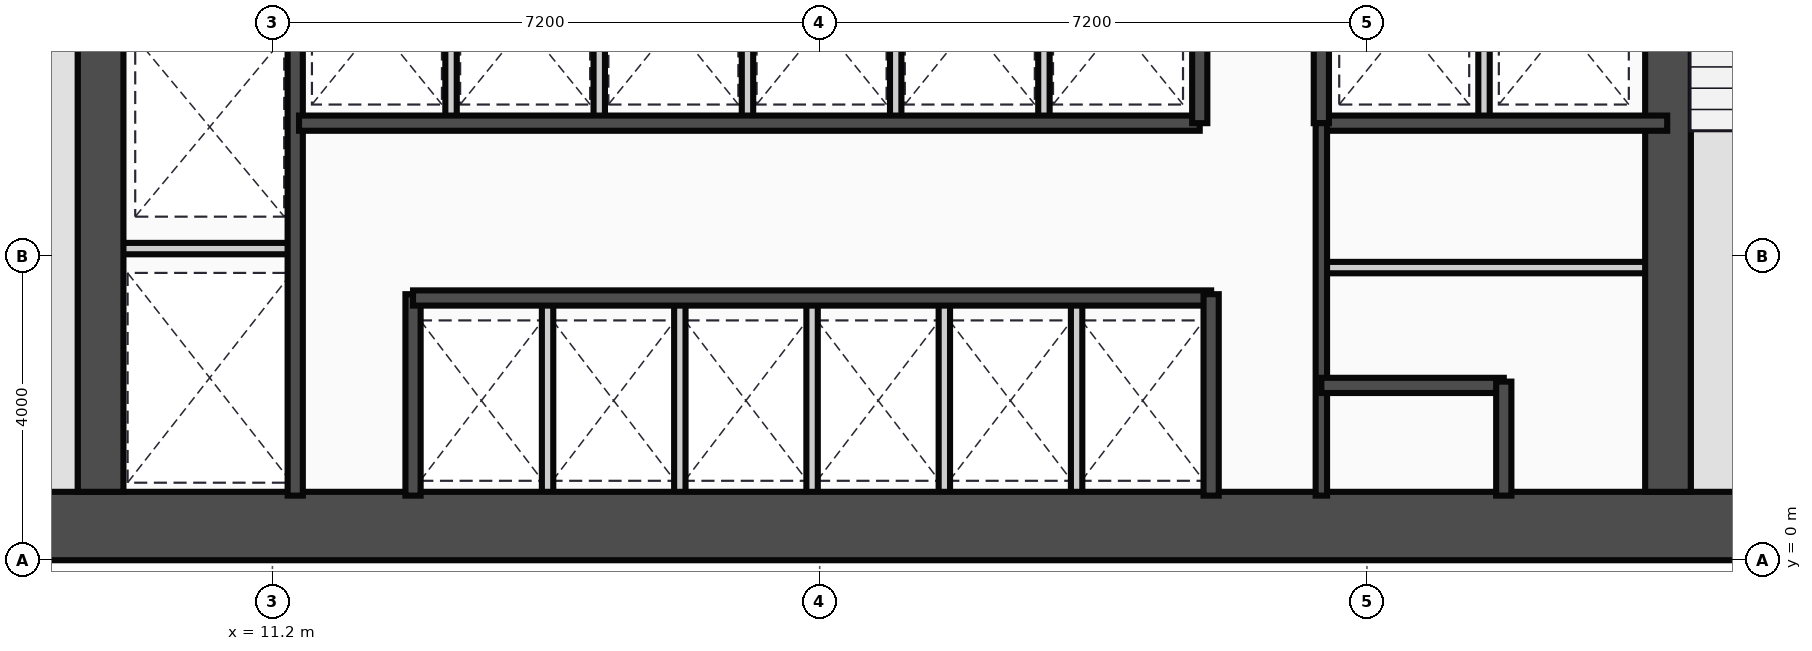
"""IFC4 building model, lengths in metres.
Left out: names, types, materials, properties, quantities, classifications, styles, units other than length and angle.
Written with IfcOpenShell. Run it as: python <this file> out.ifc"""

import sys

from ifc_helpers import new_model, si_unit, direction, frame, frame_2d, origin, place, context, subcontext, project, spatial, rectangle, extrude, source, transform, mapped, element, fill, save


model = new_model("IFC4")
c1 = context("Model", 3, precision=1e-05, world=origin(), true_north=direction((0.0, 1.0)))
c2 = subcontext(c1, "Body", "Model", "MODEL_VIEW")
j1 = project(units=[si_unit("LENGTHUNIT", "METRE"), si_unit("PLANEANGLEUNIT", "RADIAN")], contexts=[c1])
p1 = place(None, origin())
s1 = spatial("IfcSite", under=j1, at=p1, CompositionType="ELEMENT")
p2 = place(p1, origin())
s2 = spatial("IfcBuilding", under=s1, at=p2, CompositionType="ELEMENT")
p3 = place(p2, frame((0.0, 0.0, 32.5)))
s3 = spatial("IfcBuildingStorey", under=s2, at=p3, CompositionType="ELEMENT", Elevation=32.5)
m1 = source(origin(), c2, "Body", "SweptSolid", [
    extrude(rectangle(XDim=29.5, YDim=0.9, at=frame_2d((14.75, 0.0))), origin(), (0.0, 0.0, 1.0), 3.65),
])
p4 = place(p3, frame((4.5, 0.45, 0.0), z_axis=(0.0, 0.0, 1.0), x_axis=(1.0, 0.0, 0.0)))
e1 = element("IfcWall", 1, at=p4, inside=s3, PredefinedType="SHEAR", context=c2, shape_type="MappedRepresentation", body=[
    mapped(m1, transform((0.0, 0.0, 0.0))),
])
m2 = source(origin(), c2, "Body", "SweptSolid", [
    extrude(rectangle(XDim=12.2, YDim=0.6, at=frame_2d((6.1, 0.0))), origin(), (0.0, 0.0, 1.0), 3.65),
])
for number, where, z_axis, x_axis in (
    (2, (8.94, 0.9, 0.0), (0.0, 0.0, 1.0), (0.0, 1.0, 0.0)),
    (3, (29.56, 0.9, 0.0), (0.0, 0.0, 1.0), (0.0, 1.0, 0.0)),
):
    element("IfcWall", number, at=place(p3, frame(where, z_axis=z_axis, x_axis=x_axis)), inside=s3, PredefinedType="SHEAR", context=c2, shape_type="MappedRepresentation", body=[
        mapped(m2, transform((0.0, 0.0, 0.0))),
    ])
m3 = source(origin(), c2, "Body", "SweptSolid", [
    extrude(rectangle(XDim=9.6, YDim=0.2, at=frame_2d((4.8, 0.0))), origin(), (0.0, 0.0, 1.0), 3.4),
])
p5 = place(p3, frame((11.5, 0.85, 0.0), z_axis=(0.0, 0.0, 1.0), x_axis=(0.0, 1.0, 0.0)))
e4 = element("IfcWall", 4, at=p5, inside=s3, PredefinedType="PARTITIONING", context=c2, shape_type="MappedRepresentation", body=[
    mapped(m3, transform((0.0, 0.0, 0.0))),
])
p6 = place(p5, frame((4.2, 0.0, 0.0)))
e5 = element("IfcOpeningElement", 5, at=p6, cuts=e4, PredefinedType="OPENING", context=c2, shape_type="SweptSolid", body=[
    extrude(rectangle(XDim=1.1, YDim=2.15, at=frame_2d((0.55, 1.075))), frame((0.0, 0.11, 0.0), z_axis=(0.0, -1.0, 0.0), x_axis=(1.0, 0.0, 0.0)), (0.0, 0.0, 1.0), 0.22),
])
p7 = place(p5, frame((0.9, 0.0, 0.0)))
e6 = element("IfcOpeningElement", 6, at=p7, cuts=e4, PredefinedType="OPENING", context=c2, shape_type="SweptSolid", body=[
    extrude(rectangle(XDim=1.2, YDim=2.15, at=frame_2d((0.6, 1.075))), frame((0.0, 0.11, 0.0), z_axis=(0.0, -1.0, 0.0), x_axis=(1.0, 0.0, 0.0)), (0.0, 0.0, 1.0), 0.22),
])
m4 = source(origin(), c2, "Body", "SweptSolid", [
    extrude(rectangle(XDim=2.4, YDim=0.15, at=frame_2d((1.2, 0.0))), origin(), (0.0, 0.0, 1.0), 3.4),
])
p8 = place(p3, frame((9.1, 4.1, 0.0), z_axis=(0.0, 0.0, 1.0), x_axis=(1.0, 0.0, 0.0)))
e7 = element("IfcWall", 7, at=p8, inside=s3, PredefinedType="PARTITIONING", context=c2, shape_type="MappedRepresentation", body=[
    mapped(m4, transform((0.0, 0.0, 0.0))),
])
m5 = source(origin(), c2, "Body", "SweptSolid", [
    extrude(rectangle(XDim=2.65, YDim=0.2, at=frame_2d((1.325, 0.0))), origin(), (0.0, 0.0, 1.0), 3.4),
])
p9 = place(p3, frame((13.05, 0.85, 0.0), z_axis=(0.0, 0.0, 1.0), x_axis=(0.0, 1.0, 0.0)))
e8 = element("IfcWall", 8, at=p9, inside=s3, PredefinedType="PARTITIONING", context=c2, shape_type="MappedRepresentation", body=[
    mapped(m5, transform((0.0, 0.0, 0.0))),
])
m6 = source(origin(), c2, "Body", "SweptSolid", [
    extrude(rectangle(XDim=10.5, YDim=0.2, at=frame_2d((5.25, 0.0))), origin(), (0.0, 0.0, 1.0), 3.4),
])
p10 = place(p3, frame((13.05, 3.45, 0.0), z_axis=(0.0, 0.0, 1.0), x_axis=(1.0, 0.0, 0.0)))
e9 = element("IfcWall", 9, at=p10, inside=s3, PredefinedType="PARTITIONING", context=c2, shape_type="MappedRepresentation", body=[
    mapped(m6, transform((0.0, 0.0, 0.0))),
])
p11 = place(p10, frame((0.38, 0.0, 0.0)))
e10 = element("IfcOpeningElement", 10, at=p11, cuts=e9, PredefinedType="OPENING", context=c2, shape_type="SweptSolid", body=[
    extrude(rectangle(XDim=1.05, YDim=2.15, at=frame_2d((0.525, 1.075))), frame((0.0, 0.11, 0.0), z_axis=(0.0, -1.0, 0.0), x_axis=(1.0, 0.0, 0.0)), (0.0, 0.0, 1.0), 0.22),
])
p12 = place(p10, frame((2.12, 0.0, 0.0)))
e11 = element("IfcOpeningElement", 11, at=p12, cuts=e9, PredefinedType="OPENING", context=c2, shape_type="SweptSolid", body=[
    extrude(rectangle(XDim=1.05, YDim=2.15, at=frame_2d((0.525, 1.075))), frame((0.0, 0.11, 0.0), z_axis=(0.0, -1.0, 0.0), x_axis=(1.0, 0.0, 0.0)), (0.0, 0.0, 1.0), 0.22),
])
p13 = place(p10, frame((3.86, 0.0, 0.0)))
e12 = element("IfcOpeningElement", 12, at=p13, cuts=e9, PredefinedType="OPENING", context=c2, shape_type="SweptSolid", body=[
    extrude(rectangle(XDim=1.05, YDim=2.15, at=frame_2d((0.525, 1.075))), frame((0.0, 0.11, 0.0), z_axis=(0.0, -1.0, 0.0), x_axis=(1.0, 0.0, 0.0)), (0.0, 0.0, 1.0), 0.22),
])
p14 = place(p10, frame((5.6, 0.0, 0.0)))
e13 = element("IfcOpeningElement", 13, at=p14, cuts=e9, PredefinedType="OPENING", context=c2, shape_type="SweptSolid", body=[
    extrude(rectangle(XDim=1.05, YDim=2.15, at=frame_2d((0.525, 1.075))), frame((0.0, 0.11, 0.0), z_axis=(0.0, -1.0, 0.0), x_axis=(1.0, 0.0, 0.0)), (0.0, 0.0, 1.0), 0.22),
])
p15 = place(p10, frame((7.34, 0.0, 0.0)))
e14 = element("IfcOpeningElement", 14, at=p15, cuts=e9, PredefinedType="OPENING", context=c2, shape_type="SweptSolid", body=[
    extrude(rectangle(XDim=1.05, YDim=2.15, at=frame_2d((0.525, 1.075))), frame((0.0, 0.11, 0.0), z_axis=(0.0, -1.0, 0.0), x_axis=(1.0, 0.0, 0.0)), (0.0, 0.0, 1.0), 0.22),
])
p16 = place(p10, frame((9.08, 0.0, 0.0)))
e15 = element("IfcOpeningElement", 15, at=p16, cuts=e9, PredefinedType="OPENING", context=c2, shape_type="SweptSolid", body=[
    extrude(rectangle(XDim=1.05, YDim=2.15, at=frame_2d((0.525, 1.075))), frame((0.0, 0.11, 0.0), z_axis=(0.0, -1.0, 0.0), x_axis=(1.0, 0.0, 0.0)), (0.0, 0.0, 1.0), 0.22),
])
p17 = place(p3, frame((23.55, 0.85, 0.0), z_axis=(0.0, 0.0, 1.0), x_axis=(0.0, 1.0, 0.0)))
e16 = element("IfcWall", 16, at=p17, inside=s3, PredefinedType="PARTITIONING", context=c2, shape_type="MappedRepresentation", body=[
    mapped(m5, transform((0.0, 0.0, 0.0))),
])
m7 = source(origin(), c2, "Body", "SweptSolid", [
    extrude(rectangle(XDim=2.6, YDim=0.15, at=frame_2d((1.3, 0.0))), origin(), (0.0, 0.0, 1.0), 3.4),
])
for number, where, z_axis, x_axis in (
    (17, (14.82, 0.85, 0.0), (0.0, 0.0, 1.0), (0.0, 1.0, 0.0)),
    (18, (16.56, 0.85, 0.0), (0.0, 0.0, 1.0), (0.0, 1.0, 0.0)),
    (19, (18.3, 0.85, 0.0), (0.0, 0.0, 1.0), (0.0, 1.0, 0.0)),
    (20, (20.04, 0.85, 0.0), (0.0, 0.0, 1.0), (0.0, 1.0, 0.0)),
    (21, (21.78, 0.85, 0.0), (0.0, 0.0, 1.0), (0.0, 1.0, 0.0)),
):
    element("IfcWall", number, at=place(p3, frame(where, z_axis=z_axis, x_axis=x_axis)), inside=s3, PredefinedType="PARTITIONING", context=c2, shape_type="MappedRepresentation", body=[
        mapped(m7, transform((0.0, 0.0, 0.0))),
    ])
m8 = source(origin(), c2, "Body", "SweptSolid", [
    extrude(rectangle(XDim=11.85, YDim=0.2, at=frame_2d((5.925, 0.0))), origin(), (0.0, 0.0, 1.0), 3.4),
])
p18 = place(p3, frame((11.55, 5.75, 0.0), z_axis=(0.0, 0.0, 1.0), x_axis=(1.0, 0.0, 0.0)))
e22 = element("IfcWall", 22, at=p18, inside=s3, PredefinedType="PARTITIONING", context=c2, shape_type="MappedRepresentation", body=[
    mapped(m8, transform((0.0, 0.0, 0.0))),
])
m9 = source(origin(), c2, "Body", "SweptSolid", [
    extrude(rectangle(XDim=2.6, YDim=0.2, at=frame_2d((1.3, 0.0))), origin(), (0.0, 0.0, 1.0), 3.4),
])
p19 = place(p3, frame((23.4, 5.75, 0.0), z_axis=(0.0, 0.0, 1.0), x_axis=(0.0, 1.0, 0.0)))
e23 = element("IfcWall", 23, at=p19, inside=s3, PredefinedType="PARTITIONING", context=c2, shape_type="MappedRepresentation", body=[
    mapped(m9, transform((0.0, 0.0, 0.0))),
])
m10 = source(origin(), c2, "Body", "SweptSolid", [
    extrude(rectangle(XDim=2.5, YDim=0.15, at=frame_2d((1.25, 0.0))), origin(), (0.0, 0.0, 1.0), 3.4),
])
for number, where, z_axis, x_axis in (
    (24, (13.55, 5.8, 0.0), (0.0, 0.0, 1.0), (0.0, 1.0, 0.0)),
    (25, (15.5, 5.8, 0.0), (0.0, 0.0, 1.0), (0.0, 1.0, 0.0)),
    (26, (17.45, 5.8, 0.0), (0.0, 0.0, 1.0), (0.0, 1.0, 0.0)),
    (27, (19.4, 5.8, 0.0), (0.0, 0.0, 1.0), (0.0, 1.0, 0.0)),
    (28, (21.35, 5.8, 0.0), (0.0, 0.0, 1.0), (0.0, 1.0, 0.0)),
):
    element("IfcWall", number, at=place(p3, frame(where, z_axis=z_axis, x_axis=x_axis)), inside=s3, PredefinedType="PARTITIONING", context=c2, shape_type="MappedRepresentation", body=[
        mapped(m10, transform((0.0, 0.0, 0.0))),
    ])
m11 = source(origin(), c2, "Body", "SweptSolid", [
    extrude(rectangle(XDim=4.55, YDim=0.2, at=frame_2d((2.275, 0.0))), origin(), (0.0, 0.0, 1.0), 3.4),
])
p20 = place(p3, frame((25.0, 5.75, 0.0), z_axis=(0.0, 0.0, 1.0), x_axis=(1.0, 0.0, 0.0)))
e29 = element("IfcWall", 29, at=p20, inside=s3, PredefinedType="PARTITIONING", context=c2, shape_type="MappedRepresentation", body=[
    mapped(m11, transform((0.0, 0.0, 0.0))),
])
p21 = place(p3, frame((25.0, 5.75, 0.0), z_axis=(0.0, 0.0, 1.0), x_axis=(0.0, 1.0, 0.0)))
e30 = element("IfcWall", 30, at=p21, inside=s3, PredefinedType="PARTITIONING", context=c2, shape_type="MappedRepresentation", body=[
    mapped(m9, transform((0.0, 0.0, 0.0))),
])
p22 = place(p3, frame((27.14, 5.8, 0.0), z_axis=(0.0, 0.0, 1.0), x_axis=(0.0, 1.0, 0.0)))
e31 = element("IfcWall", 31, at=p22, inside=s3, PredefinedType="PARTITIONING", context=c2, shape_type="MappedRepresentation", body=[
    mapped(m10, transform((0.0, 0.0, 0.0))),
])
m12 = source(origin(), c2, "Body", "SweptSolid", [
    extrude(rectangle(XDim=4.9, YDim=0.15, at=frame_2d((2.45, 0.0))), origin(), (0.0, 0.0, 1.0), 3.4),
])
p23 = place(p3, frame((25.0, 0.85, 0.0), z_axis=(0.0, 0.0, 1.0), x_axis=(0.0, 1.0, 0.0)))
e32 = element("IfcWall", 32, at=p23, inside=s3, PredefinedType="PARTITIONING", context=c2, shape_type="MappedRepresentation", body=[
    mapped(m12, transform((0.0, 0.0, 0.0))),
])
p24 = place(p23, frame((1.8, 0.0, 0.0)))
e33 = element("IfcOpeningElement", 33, at=p24, cuts=e32, PredefinedType="OPENING", context=c2, shape_type="SweptSolid", body=[
    extrude(rectangle(XDim=0.95, YDim=2.15, at=frame_2d((0.475, 1.075))), frame((0.0, 0.085, 0.0), z_axis=(0.0, -1.0, 0.0), x_axis=(1.0, 0.0, 0.0)), (0.0, 0.0, 1.0), 0.17),
])
p25 = place(p23, frame((3.45, 0.0, 0.0)))
e34 = element("IfcOpeningElement", 34, at=p25, cuts=e32, PredefinedType="OPENING", context=c2, shape_type="SweptSolid", body=[
    extrude(rectangle(XDim=0.95, YDim=2.15, at=frame_2d((0.475, 1.075))), frame((0.0, 0.085, 0.0), z_axis=(0.0, -1.0, 0.0), x_axis=(1.0, 0.0, 0.0)), (0.0, 0.0, 1.0), 0.17),
])
m13 = source(origin(), c2, "Body", "SweptSolid", [
    extrude(rectangle(XDim=2.4, YDim=0.2, at=frame_2d((1.2, 0.0))), origin(), (0.0, 0.0, 1.0), 3.4),
])
p26 = place(p3, frame((25.0, 2.3, 0.0), z_axis=(0.0, 0.0, 1.0), x_axis=(1.0, 0.0, 0.0)))
e35 = element("IfcWall", 35, at=p26, inside=s3, PredefinedType="PARTITIONING", context=c2, shape_type="MappedRepresentation", body=[
    mapped(m13, transform((0.0, 0.0, 0.0))),
])
m14 = source(origin(), c2, "Body", "SweptSolid", [
    extrude(rectangle(XDim=1.5, YDim=0.2, at=frame_2d((0.75, 0.0))), origin(), (0.0, 0.0, 1.0), 3.4),
])
p27 = place(p3, frame((27.4, 0.85, 0.0), z_axis=(0.0, 0.0, 1.0), x_axis=(0.0, 1.0, 0.0)))
e36 = element("IfcWall", 36, at=p27, inside=s3, PredefinedType="PARTITIONING", context=c2, shape_type="MappedRepresentation", body=[
    mapped(m14, transform((0.0, 0.0, 0.0))),
])
m15 = source(origin(), c2, "Body", "SweptSolid", [
    extrude(rectangle(XDim=4.55, YDim=0.15, at=frame_2d((2.275, 0.0))), origin(), (0.0, 0.0, 1.0), 3.4),
])
p28 = place(p3, frame((25.0, 3.85, 0.0), z_axis=(0.0, 0.0, 1.0), x_axis=(1.0, 0.0, 0.0)))
e37 = element("IfcWall", 37, at=p28, inside=s3, PredefinedType="PARTITIONING", context=c2, shape_type="MappedRepresentation", body=[
    mapped(m15, transform((0.0, 0.0, 0.0))),
])
m16 = source(origin(), c2, "Body", "SweptSolid", [
    extrude(rectangle(XDim=1.1, YDim=2.15, at=frame_2d((0.55, 1.075))), frame((0.0, 0.025, 0.0), z_axis=(0.0, -1.0, 0.0), x_axis=(1.0, 0.0, 0.0)), (0.0, 0.0, 1.0), 0.05),
])
p29 = place(p6, frame((1.1, 0.0, 0.0), z_axis=(0.0, 0.0, 1.0), x_axis=(-1.0, 0.0, 0.0)))
e38 = element("IfcDoor", 38, at=p29, inside=s3, OperationType="SLIDING_TO_LEFT", PredefinedType="DOOR", context=c2, shape_type="MappedRepresentation", body=[
    mapped(m16, transform((0.0, 0.0, 0.0))),
])
fill(e5, e38)
m17 = source(origin(), c2, "Body", "SweptSolid", [
    extrude(rectangle(XDim=1.2, YDim=2.15, at=frame_2d((0.6, 1.075))), frame((0.0, 0.025, 0.0), z_axis=(0.0, -1.0, 0.0), x_axis=(1.0, 0.0, 0.0)), (0.0, 0.0, 1.0), 0.05),
])
p30 = place(p7, frame((1.2, 0.0, 0.0), z_axis=(0.0, 0.0, 1.0), x_axis=(-1.0, 0.0, 0.0)))
e39 = element("IfcDoor", 39, at=p30, inside=s3, OperationType="SLIDING_TO_LEFT", PredefinedType="DOOR", context=c2, shape_type="MappedRepresentation", body=[
    mapped(m17, transform((0.0, 0.0, 0.0))),
])
fill(e6, e39)
m18 = source(origin(), c2, "Body", "SweptSolid", [
    extrude(rectangle(XDim=1.05, YDim=2.15, at=frame_2d((0.525, 1.075))), frame((0.0, 0.025, 0.0), z_axis=(0.0, -1.0, 0.0), x_axis=(1.0, 0.0, 0.0)), (0.0, 0.0, 1.0), 0.05),
])
p31 = place(p11, origin())
e40 = element("IfcDoor", 40, at=p31, inside=s3, OperationType="SLIDING_TO_LEFT", PredefinedType="DOOR", context=c2, shape_type="MappedRepresentation", body=[
    mapped(m18, transform((0.0, 0.0, 0.0))),
])
fill(e10, e40)
p32 = place(p12, origin())
e41 = element("IfcDoor", 41, at=p32, inside=s3, OperationType="SLIDING_TO_LEFT", PredefinedType="DOOR", context=c2, shape_type="MappedRepresentation", body=[
    mapped(m18, transform((0.0, 0.0, 0.0))),
])
fill(e11, e41)
p33 = place(p13, origin())
e42 = element("IfcDoor", 42, at=p33, inside=s3, OperationType="SLIDING_TO_LEFT", PredefinedType="DOOR", context=c2, shape_type="MappedRepresentation", body=[
    mapped(m18, transform((0.0, 0.0, 0.0))),
])
fill(e12, e42)
p34 = place(p14, origin())
e43 = element("IfcDoor", 43, at=p34, inside=s3, OperationType="SLIDING_TO_LEFT", PredefinedType="DOOR", context=c2, shape_type="MappedRepresentation", body=[
    mapped(m18, transform((0.0, 0.0, 0.0))),
])
fill(e13, e43)
p35 = place(p15, origin())
e44 = element("IfcDoor", 44, at=p35, inside=s3, OperationType="SLIDING_TO_LEFT", PredefinedType="DOOR", context=c2, shape_type="MappedRepresentation", body=[
    mapped(m18, transform((0.0, 0.0, 0.0))),
])
fill(e14, e44)
p36 = place(p16, origin())
e45 = element("IfcDoor", 45, at=p36, inside=s3, OperationType="SLIDING_TO_LEFT", PredefinedType="DOOR", context=c2, shape_type="MappedRepresentation", body=[
    mapped(m18, transform((0.0, 0.0, 0.0))),
])
fill(e15, e45)
m19 = source(origin(), c2, "Body", "SweptSolid", [
    extrude(rectangle(XDim=0.95, YDim=2.15, at=frame_2d((0.475, 1.075))), frame((0.0, 0.025, 0.0), z_axis=(0.0, -1.0, 0.0), x_axis=(1.0, 0.0, 0.0)), (0.0, 0.0, 1.0), 0.05),
])
p37 = place(p24, origin())
e46 = element("IfcDoor", 46, at=p37, inside=s3, OperationType="SINGLE_SWING_LEFT", PredefinedType="DOOR", context=c2, shape_type="MappedRepresentation", body=[
    mapped(m19, transform((0.0, 0.0, 0.0))),
])
fill(e33, e46)
p38 = place(p25, origin())
e47 = element("IfcDoor", 47, at=p38, inside=s3, OperationType="SINGLE_SWING_RIGHT", PredefinedType="DOOR", context=c2, shape_type="MappedRepresentation", body=[
    mapped(m19, transform((0.0, 0.0, 0.0))),
])
fill(e34, e47)
save(model, sys.argv[1])
